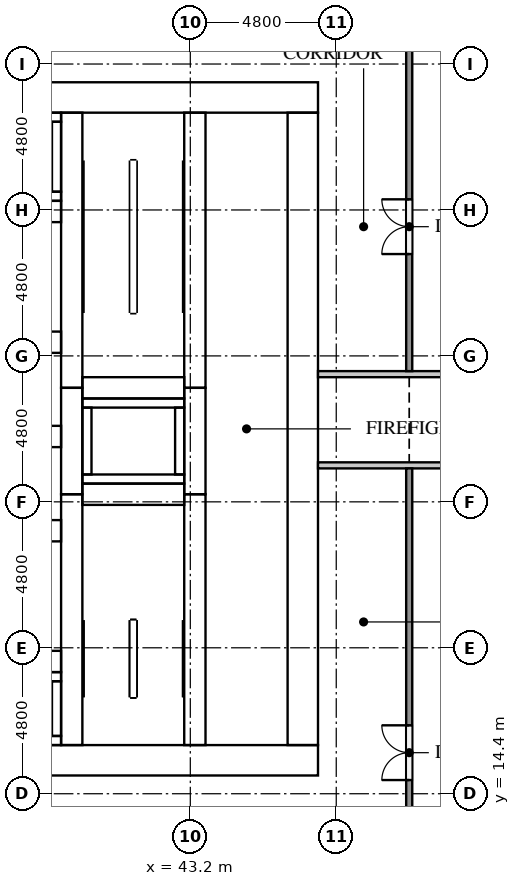
"""IFC4 building model, lengths in metres.
Left out: names, types, materials, properties, quantities, classifications, styles, units other than length and angle.
Written with IfcOpenShell. Run it as: python <this file> out.ifc"""

import sys

from ifc_helpers import new_model, si_unit, direction, frame, frame_2d, origin, place, context, subcontext, project, spatial, rectangle, extrude, element, fill, save


model = new_model("IFC4")
c1 = context("Model", 3, precision=1e-05, world=origin(), true_north=direction((0.0, 1.0)))
c2 = subcontext(c1, "Body", "Model", "MODEL_VIEW")
j1 = project(units=[si_unit("LENGTHUNIT", "METRE"), si_unit("PLANEANGLEUNIT", "RADIAN")], contexts=[c1])
p1 = place(None, origin())
s1 = spatial("IfcSite", under=j1, at=p1, CompositionType="ELEMENT")
p2 = place(p1, origin())
s2 = spatial("IfcBuilding", under=s1, at=p2, CompositionType="ELEMENT")
p3 = place(p2, origin())
s3 = spatial("IfcBuildingStorey", under=s2, at=p3, CompositionType="ELEMENT", Elevation=0.0)
p4 = place(p3, frame((15.0, 15.5, 0.0), z_axis=(0.0, 0.0, 1.0), x_axis=(1.0, 0.0, 0.0)))
e1 = element("IfcWall", 1, at=p4, inside=s3, PredefinedType="SHEAR", context=c2, shape_type="SweptSolid", body=[
    extrude(rectangle(XDim=32.4, YDim=1.0, at=frame_2d((16.2, 0.0))), origin(), (0.0, 0.0, 1.0), 5.7),
])
p5 = place(p4, frame((15.3, 0.0, 0.0)))
e2 = element("IfcOpeningElement", 2, at=p5, cuts=e1, PredefinedType="OPENING", context=c2, shape_type="SweptSolid", body=[
    extrude(rectangle(XDim=1.8, YDim=2.1, at=frame_2d((0.9, 1.05))), frame((0.0, 0.51, 0.0), z_axis=(0.0, -1.0, 0.0), x_axis=(1.0, 0.0, 0.0)), (0.0, 0.0, 1.0), 1.02),
])
p6 = place(p3, frame((15.0, 37.3, 0.0), z_axis=(0.0, 0.0, 1.0), x_axis=(1.0, 0.0, 0.0)))
e3 = element("IfcWall", 3, at=p6, inside=s3, PredefinedType="SHEAR", context=c2, shape_type="SweptSolid", body=[
    extrude(rectangle(XDim=32.4, YDim=1.0, at=frame_2d((16.2, 0.0))), origin(), (0.0, 0.0, 1.0), 5.7),
])
p7 = place(p6, frame((15.3, 0.0, 0.0)))
e4 = element("IfcOpeningElement", 4, at=p7, cuts=e3, PredefinedType="OPENING", context=c2, shape_type="SweptSolid", body=[
    extrude(rectangle(XDim=1.8, YDim=2.1, at=frame_2d((0.9, 1.05))), frame((0.0, 0.51, 0.0), z_axis=(0.0, -1.0, 0.0), x_axis=(1.0, 0.0, 0.0)), (0.0, 0.0, 1.0), 1.02),
])
p8 = place(p6, frame((1.766, 0.0, 0.0)))
e5 = element("IfcOpeningElement", 5, at=p8, cuts=e3, PredefinedType="OPENING", context=c2, shape_type="SweptSolid", body=[
    extrude(rectangle(XDim=1.0, YDim=2.1, at=frame_2d((0.5, 1.05))), frame((0.0, 0.51, 0.0), z_axis=(0.0, -1.0, 0.0), x_axis=(1.0, 0.0, 0.0)), (0.0, 0.0, 1.0), 1.02),
])
p9 = place(p6, frame((5.241, 0.0, 0.0)))
e6 = element("IfcOpeningElement", 6, at=p9, cuts=e3, PredefinedType="OPENING", context=c2, shape_type="SweptSolid", body=[
    extrude(rectangle(XDim=1.0, YDim=2.1, at=frame_2d((0.5, 1.05))), frame((0.0, 0.51, 0.0), z_axis=(0.0, -1.0, 0.0), x_axis=(1.0, 0.0, 0.0)), (0.0, 0.0, 1.0), 1.02),
])
p10 = place(p3, frame((46.9, 16.0, 0.0), z_axis=(0.0, 0.0, 1.0), x_axis=(0.0, 1.0, 0.0)))
e7 = element("IfcWall", 7, at=p10, inside=s3, PredefinedType="SHEAR", context=c2, shape_type="SweptSolid", body=[
    extrude(rectangle(XDim=20.8, YDim=1.0, at=frame_2d((10.4, 0.0))), origin(), (0.0, 0.0, 1.0), 5.7),
])
p11 = place(p10, frame((10.1, 0.0, 0.0)))
e8 = element("IfcOpeningElement", 8, at=p11, cuts=e7, PredefinedType="OPENING", context=c2, shape_type="SweptSolid", body=[
    extrude(rectangle(XDim=1.2, YDim=2.1, at=frame_2d((0.6, 1.05))), frame((0.0, 0.51, 0.0), z_axis=(0.0, -1.0, 0.0), x_axis=(1.0, 0.0, 0.0)), (0.0, 0.0, 1.0), 1.02),
])
p12 = place(p3, frame((39.3, 16.0, 0.0), z_axis=(0.0, 0.0, 1.0), x_axis=(0.0, 1.0, 0.0)))
e9 = element("IfcWall", 9, at=p12, inside=s3, PredefinedType="SHEAR", context=c2, shape_type="SweptSolid", body=[
    extrude(rectangle(XDim=8.25, YDim=0.7, at=frame_2d((4.125, 0.0))), origin(), (0.0, 0.0, 1.0), 5.7),
])
p13 = place(p3, frame((39.3, 24.25, 0.0), z_axis=(0.0, 0.0, 1.0), x_axis=(0.0, 1.0, 0.0)))
e10 = element("IfcWall", 10, at=p13, inside=s3, PredefinedType="SHEAR", context=c2, shape_type="SweptSolid", body=[
    extrude(rectangle(XDim=3.5, YDim=0.7, at=frame_2d((1.75, 0.0))), origin(), (0.0, 0.0, 1.0), 5.7),
])
p14 = place(p3, frame((39.3, 27.75, 0.0), z_axis=(0.0, 0.0, 1.0), x_axis=(0.0, 1.0, 0.0)))
e11 = element("IfcWall", 11, at=p14, inside=s3, PredefinedType="SHEAR", context=c2, shape_type="SweptSolid", body=[
    extrude(rectangle(XDim=9.05, YDim=0.7, at=frame_2d((4.525, 0.0))), origin(), (0.0, 0.0, 1.0), 5.7),
])
p15 = place(p3, frame((43.35, 16.0, 0.0), z_axis=(0.0, 0.0, 1.0), x_axis=(0.0, 1.0, 0.0)))
e12 = element("IfcWall", 12, at=p15, inside=s3, PredefinedType="SHEAR", context=c2, shape_type="SweptSolid", body=[
    extrude(rectangle(XDim=8.25, YDim=0.7, at=frame_2d((4.125, 0.0))), origin(), (0.0, 0.0, 1.0), 5.7),
])
p16 = place(p15, frame((0.2, 0.0, 0.0)))
e13 = element("IfcOpeningElement", 13, at=p16, cuts=e12, PredefinedType="OPENING", context=c2, shape_type="SweptSolid", body=[
    extrude(rectangle(XDim=1.2, YDim=2.1, at=frame_2d((0.6, 1.05))), frame((0.0, 0.36, 0.0), z_axis=(0.0, -1.0, 0.0), x_axis=(1.0, 0.0, 0.0)), (0.0, 0.0, 1.0), 0.72),
])
p17 = place(p3, frame((43.35, 24.25, 0.0), z_axis=(0.0, 0.0, 1.0), x_axis=(0.0, 1.0, 0.0)))
e14 = element("IfcWall", 14, at=p17, inside=s3, PredefinedType="SHEAR", context=c2, shape_type="SweptSolid", body=[
    extrude(rectangle(XDim=3.5, YDim=0.7, at=frame_2d((1.75, 0.0))), origin(), (0.0, 0.0, 1.0), 5.7),
])
p18 = place(p17, frame((1.2, 0.0, 0.0)))
e15 = element("IfcOpeningElement", 15, at=p18, cuts=e14, PredefinedType="OPENING", context=c2, shape_type="SweptSolid", body=[
    extrude(rectangle(XDim=1.1, YDim=2.1, at=frame_2d((0.55, 1.05))), frame((0.0, 0.36, 0.0), z_axis=(0.0, -1.0, 0.0), x_axis=(1.0, 0.0, 0.0)), (0.0, 0.0, 1.0), 0.72),
])
p19 = place(p3, frame((43.35, 27.75, 0.0), z_axis=(0.0, 0.0, 1.0), x_axis=(0.0, 1.0, 0.0)))
e16 = element("IfcWall", 16, at=p19, inside=s3, PredefinedType="SHEAR", context=c2, shape_type="SweptSolid", body=[
    extrude(rectangle(XDim=9.05, YDim=0.7, at=frame_2d((4.525, 0.0))), origin(), (0.0, 0.0, 1.0), 5.7),
])
p20 = place(p19, frame((7.65, 0.0, 0.0)))
e17 = element("IfcOpeningElement", 17, at=p20, cuts=e16, PredefinedType="OPENING", context=c2, shape_type="SweptSolid", body=[
    extrude(rectangle(XDim=1.2, YDim=2.1, at=frame_2d((0.6, 1.05))), frame((0.0, 0.36, 0.0), z_axis=(0.0, -1.0, 0.0), x_axis=(1.0, 0.0, 0.0)), (0.0, 0.0, 1.0), 0.72),
])
for number, where, z_axis, x_axis in (
    (18, (39.65, 24.25, 0.0), (0.0, 0.0, 1.0), (1.0, 0.0, 0.0)),
    (19, (39.65, 27.75, 0.0), (0.0, 0.0, 1.0), (1.0, 0.0, 0.0)),
):
    element("IfcWall", number, at=place(p3, frame(where, z_axis=z_axis, x_axis=x_axis)), inside=s3, PredefinedType="SHEAR", context=c2, shape_type="SweptSolid", body=[
        extrude(rectangle(XDim=3.35, YDim=0.7, at=frame_2d((1.675, 0.0))), origin(), (0.0, 0.0, 1.0), 5.7),
    ])
p21 = place(p3, frame((33.35, 18.75, 0.0), z_axis=(0.0, 0.0, 1.0), x_axis=(1.0, 0.0, 0.0)))
e20 = element("IfcWall", 20, at=p21, inside=s3, PredefinedType="SHEAR", context=c2, shape_type="SweptSolid", body=[
    extrude(rectangle(XDim=5.6, YDim=0.7, at=frame_2d((2.8, 0.0))), origin(), (0.0, 0.0, 1.0), 5.7),
])
p22 = place(p21, frame((1.325, 0.0, 0.0)))
e21 = element("IfcOpeningElement", 21, at=p22, cuts=e20, PredefinedType="OPENING", context=c2, shape_type="SweptSolid", body=[
    extrude(rectangle(XDim=1.1, YDim=2.1, at=frame_2d((0.55, 1.05))), frame((0.0, 0.36, 0.0), z_axis=(0.0, -1.0, 0.0), x_axis=(1.0, 0.0, 0.0)), (0.0, 0.0, 1.0), 0.72),
])
p23 = place(p21, frame((3.875, 0.0, 0.0)))
e22 = element("IfcOpeningElement", 22, at=p23, cuts=e20, PredefinedType="OPENING", context=c2, shape_type="SweptSolid", body=[
    extrude(rectangle(XDim=1.1, YDim=2.1, at=frame_2d((0.55, 1.05))), frame((0.0, 0.36, 0.0), z_axis=(0.0, -1.0, 0.0), x_axis=(1.0, 0.0, 0.0)), (0.0, 0.0, 1.0), 0.72),
])
p24 = place(p3, frame((23.45, 23.05, 0.0), z_axis=(0.0, 0.0, 1.0), x_axis=(1.0, 0.0, 0.0)))
e23 = element("IfcWall", 23, at=p24, inside=s3, PredefinedType="SHEAR", context=c2, shape_type="SweptSolid", body=[
    extrude(rectangle(XDim=15.5, YDim=0.7, at=frame_2d((7.75, 0.0))), origin(), (0.0, 0.0, 1.0), 5.7),
])
p25 = place(p24, frame((0.658, 0.0, 0.0)))
e24 = element("IfcOpeningElement", 24, at=p25, cuts=e23, PredefinedType="OPENING", context=c2, shape_type="SweptSolid", body=[
    extrude(rectangle(XDim=1.1, YDim=2.1, at=frame_2d((0.55, 1.05))), frame((0.0, 0.36, 0.0), z_axis=(0.0, -1.0, 0.0), x_axis=(1.0, 0.0, 0.0)), (0.0, 0.0, 1.0), 0.72),
])
p26 = place(p24, frame((3.275, 0.0, 0.0)))
e25 = element("IfcOpeningElement", 25, at=p26, cuts=e23, PredefinedType="OPENING", context=c2, shape_type="SweptSolid", body=[
    extrude(rectangle(XDim=1.1, YDim=2.1, at=frame_2d((0.55, 1.05))), frame((0.0, 0.36, 0.0), z_axis=(0.0, -1.0, 0.0), x_axis=(1.0, 0.0, 0.0)), (0.0, 0.0, 1.0), 0.72),
])
p27 = place(p24, frame((5.892, 0.0, 0.0)))
e26 = element("IfcOpeningElement", 26, at=p27, cuts=e23, PredefinedType="OPENING", context=c2, shape_type="SweptSolid", body=[
    extrude(rectangle(XDim=1.1, YDim=2.1, at=frame_2d((0.55, 1.05))), frame((0.0, 0.36, 0.0), z_axis=(0.0, -1.0, 0.0), x_axis=(1.0, 0.0, 0.0)), (0.0, 0.0, 1.0), 0.72),
])
p28 = place(p24, frame((8.508, 0.0, 0.0)))
e27 = element("IfcOpeningElement", 27, at=p28, cuts=e23, PredefinedType="OPENING", context=c2, shape_type="SweptSolid", body=[
    extrude(rectangle(XDim=1.1, YDim=2.1, at=frame_2d((0.55, 1.05))), frame((0.0, 0.36, 0.0), z_axis=(0.0, -1.0, 0.0), x_axis=(1.0, 0.0, 0.0)), (0.0, 0.0, 1.0), 0.72),
])
p29 = place(p24, frame((12.483, 0.0, 0.0)))
e28 = element("IfcOpeningElement", 28, at=p29, cuts=e23, PredefinedType="OPENING", context=c2, shape_type="SweptSolid", body=[
    extrude(rectangle(XDim=1.0, YDim=2.1, at=frame_2d((0.5, 1.05))), frame((0.0, 0.36, 0.0), z_axis=(0.0, -1.0, 0.0), x_axis=(1.0, 0.0, 0.0)), (0.0, 0.0, 1.0), 0.72),
])
p30 = place(p3, frame((23.45, 26.15, 0.0), z_axis=(0.0, 0.0, 1.0), x_axis=(1.0, 0.0, 0.0)))
e29 = element("IfcWall", 29, at=p30, inside=s3, PredefinedType="SHEAR", context=c2, shape_type="SweptSolid", body=[
    extrude(rectangle(XDim=15.5, YDim=0.7, at=frame_2d((7.75, 0.0))), origin(), (0.0, 0.0, 1.0), 5.7),
])
p31 = place(p3, frame((23.45, 29.25, 0.0), z_axis=(0.0, 0.0, 1.0), x_axis=(1.0, 0.0, 0.0)))
e30 = element("IfcWall", 30, at=p31, inside=s3, PredefinedType="SHEAR", context=c2, shape_type="SweptSolid", body=[
    extrude(rectangle(XDim=15.5, YDim=0.7, at=frame_2d((7.75, 0.0))), origin(), (0.0, 0.0, 1.0), 5.7),
])
p32 = place(p31, frame((3.325, 0.0, 0.0)))
e31 = element("IfcOpeningElement", 31, at=p32, cuts=e30, PredefinedType="OPENING", context=c2, shape_type="SweptSolid", body=[
    extrude(rectangle(XDim=1.0, YDim=2.1, at=frame_2d((0.5, 1.05))), frame((0.0, 0.36, 0.0), z_axis=(0.0, -1.0, 0.0), x_axis=(1.0, 0.0, 0.0)), (0.0, 0.0, 1.0), 0.72),
])
p33 = place(p31, frame((11.175, 0.0, 0.0)))
e32 = element("IfcOpeningElement", 32, at=p33, cuts=e30, PredefinedType="OPENING", context=c2, shape_type="SweptSolid", body=[
    extrude(rectangle(XDim=1.0, YDim=2.1, at=frame_2d((0.5, 1.05))), frame((0.0, 0.36, 0.0), z_axis=(0.0, -1.0, 0.0), x_axis=(1.0, 0.0, 0.0)), (0.0, 0.0, 1.0), 0.72),
])
p34 = place(p3, frame((33.35, 33.55, 0.0), z_axis=(0.0, 0.0, 1.0), x_axis=(1.0, 0.0, 0.0)))
e33 = element("IfcWall", 33, at=p34, inside=s3, PredefinedType="SHEAR", context=c2, shape_type="SweptSolid", body=[
    extrude(rectangle(XDim=5.6, YDim=0.7, at=frame_2d((2.8, 0.0))), origin(), (0.0, 0.0, 1.0), 5.7),
])
p35 = place(p34, frame((1.325, 0.0, 0.0)))
e34 = element("IfcOpeningElement", 34, at=p35, cuts=e33, PredefinedType="OPENING", context=c2, shape_type="SweptSolid", body=[
    extrude(rectangle(XDim=1.1, YDim=2.1, at=frame_2d((0.55, 1.05))), frame((0.0, 0.36, 0.0), z_axis=(0.0, -1.0, 0.0), x_axis=(1.0, 0.0, 0.0)), (0.0, 0.0, 1.0), 0.72),
])
p36 = place(p34, frame((3.875, 0.0, 0.0)))
e35 = element("IfcOpeningElement", 35, at=p36, cuts=e33, PredefinedType="OPENING", context=c2, shape_type="SweptSolid", body=[
    extrude(rectangle(XDim=1.1, YDim=2.1, at=frame_2d((0.55, 1.05))), frame((0.0, 0.36, 0.0), z_axis=(0.0, -1.0, 0.0), x_axis=(1.0, 0.0, 0.0)), (0.0, 0.0, 1.0), 0.72),
])
for number, where, z_axis, x_axis in (
    (36, (36.6, 16.15, -1.8), (0.0, 0.0, 1.0), (1.0, 0.0, 0.0)),
    (37, (36.6, 18.25, -1.8), (0.0, 0.0, 1.0), (1.0, 0.0, 0.0)),
):
    element("IfcWall", number, at=place(p3, frame(where, z_axis=z_axis, x_axis=x_axis)), inside=s3, PredefinedType="SOLIDWALL", context=c2, shape_type="SweptSolid", body=[
        extrude(rectangle(XDim=2.35, YDim=0.3, at=frame_2d((1.175, 0.0))), origin(), (0.0, 0.0, 1.0), 1.8),
    ])
p37 = place(p3, frame((38.8, 16.3, -1.8), z_axis=(0.0, 0.0, 1.0), x_axis=(0.0, 1.0, 0.0)))
e38 = element("IfcWall", 38, at=p37, inside=s3, PredefinedType="SOLIDWALL", context=c2, shape_type="SweptSolid", body=[
    extrude(rectangle(XDim=1.8, YDim=0.3, at=frame_2d((0.9, 0.0))), origin(), (0.0, 0.0, 1.0), 1.8),
])
for number, where, z_axis, x_axis in (
    (39, (36.6, 34.05, -1.8), (0.0, 0.0, 1.0), (1.0, 0.0, 0.0)),
    (40, (36.6, 36.65, -1.8), (0.0, 0.0, 1.0), (1.0, 0.0, 0.0)),
):
    element("IfcWall", number, at=place(p3, frame(where, z_axis=z_axis, x_axis=x_axis)), inside=s3, PredefinedType="SOLIDWALL", context=c2, shape_type="SweptSolid", body=[
        extrude(rectangle(XDim=2.35, YDim=0.3, at=frame_2d((1.175, 0.0))), origin(), (0.0, 0.0, 1.0), 1.8),
    ])
p38 = place(p3, frame((38.8, 34.2, -1.8), z_axis=(0.0, 0.0, 1.0), x_axis=(0.0, 1.0, 0.0)))
e41 = element("IfcWall", 41, at=p38, inside=s3, PredefinedType="SOLIDWALL", context=c2, shape_type="SweptSolid", body=[
    extrude(rectangle(XDim=2.3, YDim=0.3, at=frame_2d((1.15, 0.0))), origin(), (0.0, 0.0, 1.0), 1.8),
])
for number, where, z_axis, x_axis in (
    (42, (39.65, 24.75, -1.8), (0.0, 0.0, 1.0), (1.0, 0.0, 0.0)),
    (43, (39.65, 27.25, -1.8), (0.0, 0.0, 1.0), (1.0, 0.0, 0.0)),
):
    element("IfcWall", number, at=place(p3, frame(where, z_axis=z_axis, x_axis=x_axis)), inside=s3, PredefinedType="SOLIDWALL", context=c2, shape_type="SweptSolid", body=[
        extrude(rectangle(XDim=3.35, YDim=0.3, at=frame_2d((1.675, 0.0))), origin(), (0.0, 0.0, 1.0), 1.8),
    ])
for number, where, z_axis, x_axis in (
    (44, (39.8, 24.9, -1.8), (0.0, 0.0, 1.0), (0.0, 1.0, 0.0)),
    (45, (42.85, 24.9, -1.8), (0.0, 0.0, 1.0), (0.0, 1.0, 0.0)),
):
    element("IfcWall", number, at=place(p3, frame(where, z_axis=z_axis, x_axis=x_axis)), inside=s3, PredefinedType="SOLIDWALL", context=c2, shape_type="SweptSolid", body=[
        extrude(rectangle(XDim=2.2, YDim=0.3, at=frame_2d((1.1, 0.0))), origin(), (0.0, 0.0, 1.0), 1.8),
    ])
p39 = place(p3, frame((47.4, 25.2, 0.0), z_axis=(0.0, 0.0, 1.0), x_axis=(1.0, 0.0, 0.0)))
e46 = element("IfcWall", 46, at=p39, inside=s3, PredefinedType="PARTITIONING", context=c2, shape_type="SweptSolid", body=[
    extrude(rectangle(XDim=21.9, YDim=0.2, at=frame_2d((10.95, 0.0))), origin(), (0.0, 0.0, 1.0), 5.7),
])
p40 = place(p39, frame((17.5, 0.0, 0.0)))
e47 = element("IfcOpeningElement", 47, at=p40, cuts=e46, PredefinedType="OPENING", context=c2, shape_type="SweptSolid", body=[
    extrude(rectangle(XDim=1.0, YDim=2.1, at=frame_2d((0.5, 1.05))), frame((0.0, 0.11, 0.0), z_axis=(0.0, -1.0, 0.0), x_axis=(1.0, 0.0, 0.0)), (0.0, 0.0, 1.0), 0.22),
])
p41 = place(p3, frame((47.4, 28.2, 0.0), z_axis=(0.0, 0.0, 1.0), x_axis=(1.0, 0.0, 0.0)))
e48 = element("IfcWall", 48, at=p41, inside=s3, PredefinedType="PARTITIONING", context=c2, shape_type="SweptSolid", body=[
    extrude(rectangle(XDim=21.9, YDim=0.2, at=frame_2d((10.95, 0.0))), origin(), (0.0, 0.0, 1.0), 5.7),
])
p42 = place(p3, frame((50.4, 12.1, 0.0), z_axis=(0.0, 0.0, 1.0), x_axis=(0.0, 1.0, 0.0)))
e49 = element("IfcWall", 49, at=p42, inside=s3, PredefinedType="PARTITIONING", context=c2, shape_type="SweptSolid", body=[
    extrude(rectangle(XDim=13.0, YDim=0.2, at=frame_2d((6.5, 0.0))), origin(), (0.0, 0.0, 1.0), 5.7),
])
p43 = place(p42, frame((2.75, 0.0, 0.0)))
e50 = element("IfcOpeningElement", 50, at=p43, cuts=e49, PredefinedType="OPENING", context=c2, shape_type="SweptSolid", body=[
    extrude(rectangle(XDim=1.8, YDim=2.1, at=frame_2d((0.9, 1.05))), frame((0.0, 0.11, 0.0), z_axis=(0.0, -1.0, 0.0), x_axis=(1.0, 0.0, 0.0)), (0.0, 0.0, 1.0), 0.22),
])
p44 = place(p3, frame((50.4, 28.3, 0.0), z_axis=(0.0, 0.0, 1.0), x_axis=(0.0, 1.0, 0.0)))
e51 = element("IfcWall", 51, at=p44, inside=s3, PredefinedType="PARTITIONING", context=c2, shape_type="SweptSolid", body=[
    extrude(rectangle(XDim=12.4, YDim=0.2, at=frame_2d((6.2, 0.0))), origin(), (0.0, 0.0, 1.0), 5.7),
])
p45 = place(p44, frame((3.85, 0.0, 0.0)))
e52 = element("IfcOpeningElement", 52, at=p45, cuts=e51, PredefinedType="OPENING", context=c2, shape_type="SweptSolid", body=[
    extrude(rectangle(XDim=1.8, YDim=2.1, at=frame_2d((0.9, 1.05))), frame((0.0, 0.11, 0.0), z_axis=(0.0, -1.0, 0.0), x_axis=(1.0, 0.0, 0.0)), (0.0, 0.0, 1.0), 0.22),
])
p46 = place(p18, origin())
e53 = element("IfcDoor", 53, at=p46, inside=s3, OperationType="DOUBLE_DOOR_SLIDING", PredefinedType="DOOR", context=c2, shape_type="SweptSolid", body=[
    extrude(rectangle(XDim=1.1, YDim=2.1, at=frame_2d((0.55, 1.05))), frame((0.0, 0.025, 0.0), z_axis=(0.0, -1.0, 0.0), x_axis=(1.0, 0.0, 0.0)), (0.0, 0.0, 1.0), 0.05),
])
fill(e15, e53)
p47 = place(p16, frame((1.2, 0.0, 0.0), z_axis=(0.0, 0.0, 1.0), x_axis=(-1.0, 0.0, 0.0)))
e54 = element("IfcDoor", 54, at=p47, inside=s3, OperationType="SINGLE_SWING_LEFT", PredefinedType="DOOR", context=c2, shape_type="SweptSolid", body=[
    extrude(rectangle(XDim=1.2, YDim=2.1, at=frame_2d((0.6, 1.05))), frame((0.0, 0.025, 0.0), z_axis=(0.0, -1.0, 0.0), x_axis=(1.0, 0.0, 0.0)), (0.0, 0.0, 1.0), 0.05),
])
fill(e13, e54)
p48 = place(p20, frame((1.2, 0.0, 0.0), z_axis=(0.0, 0.0, 1.0), x_axis=(-1.0, 0.0, 0.0)))
e55 = element("IfcDoor", 55, at=p48, inside=s3, OperationType="SINGLE_SWING_RIGHT", PredefinedType="DOOR", context=c2, shape_type="SweptSolid", body=[
    extrude(rectangle(XDim=1.2, YDim=2.1, at=frame_2d((0.6, 1.05))), frame((0.0, 0.025, 0.0), z_axis=(0.0, -1.0, 0.0), x_axis=(1.0, 0.0, 0.0)), (0.0, 0.0, 1.0), 0.05),
])
fill(e17, e55)
p49 = place(p11, frame((1.2, 0.0, 0.0), z_axis=(0.0, 0.0, 1.0), x_axis=(-1.0, 0.0, 0.0)))
e56 = element("IfcDoor", 56, at=p49, inside=s3, OperationType="SINGLE_SWING_RIGHT", PredefinedType="DOOR", context=c2, shape_type="SweptSolid", body=[
    extrude(rectangle(XDim=1.2, YDim=2.1, at=frame_2d((0.6, 1.05))), frame((0.0, 0.025, 0.0), z_axis=(0.0, -1.0, 0.0), x_axis=(1.0, 0.0, 0.0)), (0.0, 0.0, 1.0), 0.05),
])
fill(e8, e56)
p50 = place(p43, origin())
e57 = element("IfcDoor", 57, at=p50, inside=s3, OperationType="DOUBLE_DOOR_SINGLE_SWING", PredefinedType="DOOR", context=c2, shape_type="SweptSolid", body=[
    extrude(rectangle(XDim=1.8, YDim=2.1, at=frame_2d((0.9, 1.05))), frame((0.0, 0.025, 0.0), z_axis=(0.0, -1.0, 0.0), x_axis=(1.0, 0.0, 0.0)), (0.0, 0.0, 1.0), 0.05),
])
fill(e50, e57)
p51 = place(p45, origin())
e58 = element("IfcDoor", 58, at=p51, inside=s3, OperationType="DOUBLE_DOOR_SINGLE_SWING", PredefinedType="DOOR", context=c2, shape_type="SweptSolid", body=[
    extrude(rectangle(XDim=1.8, YDim=2.1, at=frame_2d((0.9, 1.05))), frame((0.0, 0.025, 0.0), z_axis=(0.0, -1.0, 0.0), x_axis=(1.0, 0.0, 0.0)), (0.0, 0.0, 1.0), 0.05),
])
fill(e52, e58)
save(model, sys.argv[1])
